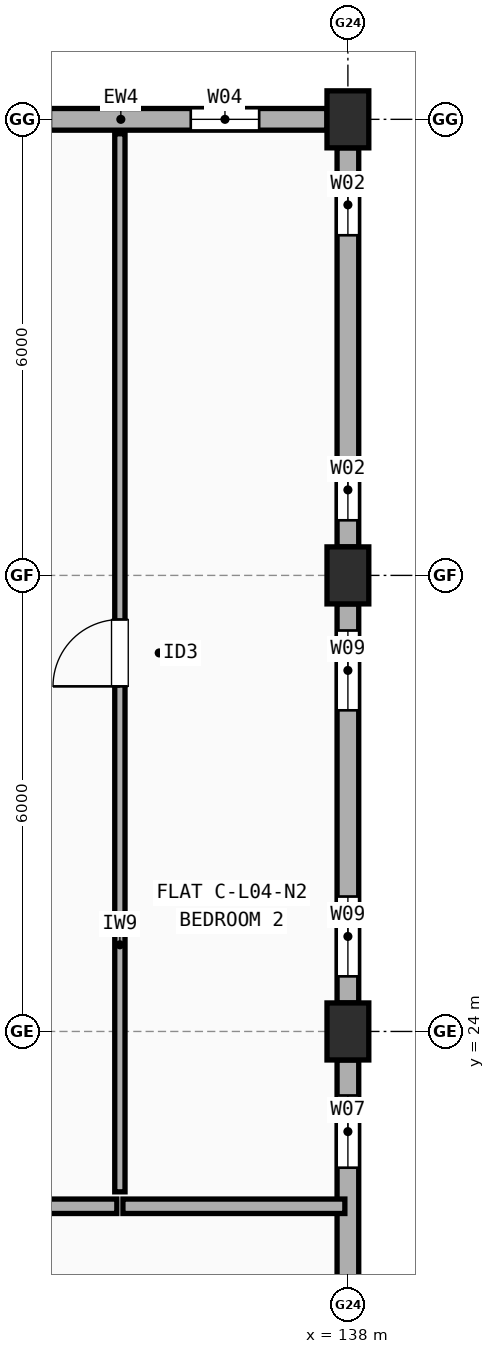
"""IFC4 building model, lengths in metres.
Left out: names, types, materials, properties, quantities, classifications, styles, units other than length and angle.
Written with IfcOpenShell. Run it as: python <this file> out.ifc"""

import sys

from ifc_helpers import new_model, si_unit, direction, frame, frame_2d, origin, origin_2d, place, context, subcontext, project, spatial, rectangle, extrude, element, fill, save


model = new_model("IFC4")
c1 = context("Model", 3, precision=1e-05, world=origin(), true_north=direction((0.0, 1.0)))
c2 = subcontext(c1, "Body", "Model", "MODEL_VIEW")
j1 = project(units=[si_unit("LENGTHUNIT", "METRE"), si_unit("PLANEANGLEUNIT", "RADIAN")], contexts=[c1])
p1 = place(None, origin())
s1 = spatial("IfcSite", under=j1, at=p1, CompositionType="ELEMENT")
p2 = place(p1, origin())
s2 = spatial("IfcBuilding", under=s1, at=p2, CompositionType="ELEMENT")
p3 = place(p2, frame((0.0, 0.0, 14.1)))
s3 = spatial("IfcBuildingStorey", under=s2, at=p3, CompositionType="ELEMENT", Elevation=14.1)
for number, where, z_axis, x_axis in (
    (1, (138.0, 24.0, 0.0), (0.0, 0.0, 1.0), (1.0, 0.0, 0.0)),
    (2, (138.0, 30.0, 0.0), (0.0, 0.0, 1.0), (1.0, 0.0, 0.0)),
    (3, (138.0, 36.0, 0.0), (0.0, 0.0, 1.0), (1.0, 0.0, 0.0)),
):
    element("IfcColumn", number, at=place(p3, frame(where, z_axis=z_axis, x_axis=x_axis)), inside=s3, PredefinedType="COLUMN", context=c2, shape_type="SweptSolid", body=[
        extrude(rectangle(XDim=0.55, YDim=0.75, at=origin_2d()), origin(), (0.0, 0.0, 1.0), 2.95),
    ])
p4 = place(p3, frame((138.0, 18.375, 0.0), z_axis=(0.0, 0.0, 1.0), x_axis=(0.0, 1.0, 0.0)))
e4 = element("IfcWall", 4, at=p4, inside=s3, PredefinedType="STANDARD", context=c2, shape_type="SweptSolid", body=[
    extrude(rectangle(XDim=5.25, YDim=0.285, at=frame_2d((2.625, 0.0))), origin(), (0.0, 0.0, 1.0), 2.432),
])
p5 = place(p4, frame((1.192, 0.0, 0.9)))
e5 = element("IfcOpeningElement", 5, at=p5, cuts=e4, PredefinedType="OPENING", context=c2, shape_type="SweptSolid", body=[
    extrude(rectangle(XDim=0.9, YDim=1.3, at=frame_2d((0.45, 0.65))), frame((0.0, 0.152, 0.0), z_axis=(0.0, -1.0, 0.0), x_axis=(1.0, 0.0, 0.0)), (0.0, 0.0, 1.0), 0.305),
])
p6 = place(p4, frame((3.833, 0.0, 0.9)))
e6 = element("IfcOpeningElement", 6, at=p6, cuts=e4, PredefinedType="OPENING", context=c2, shape_type="SweptSolid", body=[
    extrude(rectangle(XDim=0.95, YDim=1.35, at=frame_2d((0.475, 0.675))), frame((0.0, 0.152, 0.0), z_axis=(0.0, -1.0, 0.0), x_axis=(1.0, 0.0, 0.0)), (0.0, 0.0, 1.0), 0.305),
])
p7 = place(p3, frame((138.0, 24.375, 0.0), z_axis=(0.0, 0.0, 1.0), x_axis=(0.0, 1.0, 0.0)))
e7 = element("IfcWall", 7, at=p7, inside=s3, PredefinedType="STANDARD", context=c2, shape_type="SweptSolid", body=[
    extrude(rectangle(XDim=5.25, YDim=0.285, at=frame_2d((2.625, 0.0))), origin(), (0.0, 0.0, 1.0), 2.432),
])
p8 = place(p7, frame((0.35, 0.0, 0.9)))
e8 = element("IfcOpeningElement", 8, at=p8, cuts=e7, PredefinedType="OPENING", context=c2, shape_type="SweptSolid", body=[
    extrude(rectangle(XDim=1.05, YDim=1.35, at=frame_2d((0.525, 0.675))), frame((0.0, 0.152, 0.0), z_axis=(0.0, -1.0, 0.0), x_axis=(1.0, 0.0, 0.0)), (0.0, 0.0, 1.0), 0.305),
])
p9 = place(p7, frame((3.85, 0.0, 0.9)))
e9 = element("IfcOpeningElement", 9, at=p9, cuts=e7, PredefinedType="OPENING", context=c2, shape_type="SweptSolid", body=[
    extrude(rectangle(XDim=1.05, YDim=1.35, at=frame_2d((0.525, 0.675))), frame((0.0, 0.152, 0.0), z_axis=(0.0, -1.0, 0.0), x_axis=(1.0, 0.0, 0.0)), (0.0, 0.0, 1.0), 0.305),
])
p10 = place(p3, frame((138.0, 30.375, 0.0), z_axis=(0.0, 0.0, 1.0), x_axis=(0.0, 1.0, 0.0)))
e10 = element("IfcWall", 10, at=p10, inside=s3, PredefinedType="STANDARD", context=c2, shape_type="SweptSolid", body=[
    extrude(rectangle(XDim=5.25, YDim=0.285, at=frame_2d((2.625, 0.0))), origin(), (0.0, 0.0, 1.0), 2.432),
])
p11 = place(p10, frame((0.35, 0.0, 0.9)))
e11 = element("IfcOpeningElement", 11, at=p11, cuts=e10, PredefinedType="OPENING", context=c2, shape_type="SweptSolid", body=[
    extrude(rectangle(XDim=0.8, YDim=1.2, at=frame_2d((0.4, 0.6))), frame((0.0, 0.152, 0.0), z_axis=(0.0, -1.0, 0.0), x_axis=(1.0, 0.0, 0.0)), (0.0, 0.0, 1.0), 0.305),
])
p12 = place(p10, frame((4.1, 0.0, 0.9)))
e12 = element("IfcOpeningElement", 12, at=p12, cuts=e10, PredefinedType="OPENING", context=c2, shape_type="SweptSolid", body=[
    extrude(rectangle(XDim=0.8, YDim=1.2, at=frame_2d((0.4, 0.6))), frame((0.0, 0.152, 0.0), z_axis=(0.0, -1.0, 0.0), x_axis=(1.0, 0.0, 0.0)), (0.0, 0.0, 1.0), 0.305),
])
p13 = place(p3, frame((137.725, 36.0, 0.0), z_axis=(0.0, 0.0, 1.0), x_axis=(-1.0, 0.0, 0.0)))
e13 = element("IfcWall", 13, at=p13, inside=s3, PredefinedType="STANDARD", context=c2, shape_type="SweptSolid", body=[
    extrude(rectangle(XDim=5.45, YDim=0.285, at=frame_2d((2.725, 0.0))), origin(), (0.0, 0.0, 1.0), 2.432),
])
p14 = place(p13, frame((0.893, 0.0, 0.9)))
e14 = element("IfcOpeningElement", 14, at=p14, cuts=e13, PredefinedType="OPENING", context=c2, shape_type="SweptSolid", body=[
    extrude(rectangle(XDim=0.9, YDim=1.3, at=frame_2d((0.45, 0.65))), frame((0.0, 0.152, 0.0), z_axis=(0.0, -1.0, 0.0), x_axis=(1.0, 0.0, 0.0)), (0.0, 0.0, 1.0), 0.305),
])
p15 = place(p13, frame((3.633, 0.0, 0.9)))
e15 = element("IfcOpeningElement", 15, at=p15, cuts=e13, PredefinedType="OPENING", context=c2, shape_type="SweptSolid", body=[
    extrude(rectangle(XDim=0.95, YDim=1.35, at=frame_2d((0.475, 0.675))), frame((0.0, 0.152, 0.0), z_axis=(0.0, -1.0, 0.0), x_axis=(1.0, 0.0, 0.0)), (0.0, 0.0, 1.0), 0.305),
])
p16 = place(p3, frame((124.54, 21.7, 0.0), z_axis=(0.0, 0.0, 1.0), x_axis=(1.0, 0.0, 0.0)))
e16 = element("IfcWall", 16, at=p16, inside=s3, PredefinedType="SOLIDWALL", context=c2, shape_type="SweptSolid", body=[
    extrude(rectangle(XDim=10.42, YDim=0.19, at=frame_2d((5.21, 0.0))), origin(), (0.0, 0.0, 1.0), 2.432),
])
p17 = place(p16, frame((4.72, 0.0, 0.0)))
e17 = element("IfcOpeningElement", 17, at=p17, cuts=e16, PredefinedType="OPENING", context=c2, shape_type="SweptSolid", body=[
    extrude(rectangle(XDim=0.98, YDim=2.15, at=frame_2d((0.49, 1.075))), frame((0.0, 0.105, 0.0), z_axis=(0.0, -1.0, 0.0), x_axis=(1.0, 0.0, 0.0)), (0.0, 0.0, 1.0), 0.21),
])
p18 = place(p3, frame((135.04, 21.7, 0.0), z_axis=(0.0, 0.0, 1.0), x_axis=(1.0, 0.0, 0.0)))
e18 = element("IfcWall", 18, at=p18, inside=s3, PredefinedType="SOLIDWALL", context=c2, shape_type="SweptSolid", body=[
    extrude(rectangle(XDim=2.92, YDim=0.19, at=frame_2d((1.46, 0.0))), origin(), (0.0, 0.0, 1.0), 2.432),
])
p19 = place(p3, frame((135.0, 21.89, 0.0), z_axis=(0.0, 0.0, 1.0), x_axis=(0.0, 1.0, 0.0)))
e19 = element("IfcWall", 19, at=p19, inside=s3, PredefinedType="PARTITIONING", context=c2, shape_type="SweptSolid", body=[
    extrude(rectangle(XDim=13.92, YDim=0.135, at=frame_2d((6.96, 0.0))), origin(), (0.0, 0.0, 1.0), 2.432),
])
p20 = place(p19, frame((6.65, 0.0, 0.0)))
e20 = element("IfcOpeningElement", 20, at=p20, cuts=e19, PredefinedType="OPENING", context=c2, shape_type="SweptSolid", body=[
    extrude(rectangle(XDim=0.88, YDim=2.1, at=frame_2d((0.44, 1.05))), frame((0.0, 0.077, 0.0), z_axis=(0.0, -1.0, 0.0), x_axis=(1.0, 0.0, 0.0)), (0.0, 0.0, 1.0), 0.155),
])
p21 = place(p6, origin())
e21 = element("IfcWindow", 21, at=p21, inside=s3, PartitioningType="SINGLE_PANEL", PredefinedType="WINDOW", context=c2, shape_type="SweptSolid", body=[
    extrude(rectangle(XDim=0.95, YDim=1.35, at=frame_2d((0.475, 0.675))), frame((0.0, 0.03, 0.0), z_axis=(0.0, -1.0, 0.0), x_axis=(1.0, 0.0, 0.0)), (0.0, 0.0, 1.0), 0.06),
])
fill(e6, e21)
p22 = place(p8, origin())
e22 = element("IfcWindow", 22, at=p22, inside=s3, PartitioningType="SINGLE_PANEL", PredefinedType="WINDOW", context=c2, shape_type="SweptSolid", body=[
    extrude(rectangle(XDim=1.05, YDim=1.35, at=frame_2d((0.525, 0.675))), frame((0.0, 0.03, 0.0), z_axis=(0.0, -1.0, 0.0), x_axis=(1.0, 0.0, 0.0)), (0.0, 0.0, 1.0), 0.06),
])
fill(e8, e22)
p23 = place(p9, origin())
e23 = element("IfcWindow", 23, at=p23, inside=s3, PartitioningType="SINGLE_PANEL", PredefinedType="WINDOW", context=c2, shape_type="SweptSolid", body=[
    extrude(rectangle(XDim=1.05, YDim=1.35, at=frame_2d((0.525, 0.675))), frame((0.0, 0.03, 0.0), z_axis=(0.0, -1.0, 0.0), x_axis=(1.0, 0.0, 0.0)), (0.0, 0.0, 1.0), 0.06),
])
fill(e9, e23)
p24 = place(p11, origin())
e24 = element("IfcWindow", 24, at=p24, inside=s3, PartitioningType="SINGLE_PANEL", PredefinedType="WINDOW", context=c2, shape_type="SweptSolid", body=[
    extrude(rectangle(XDim=0.8, YDim=1.2, at=frame_2d((0.4, 0.6))), frame((0.0, 0.03, 0.0), z_axis=(0.0, -1.0, 0.0), x_axis=(1.0, 0.0, 0.0)), (0.0, 0.0, 1.0), 0.06),
])
fill(e11, e24)
p25 = place(p12, origin())
e25 = element("IfcWindow", 25, at=p25, inside=s3, PartitioningType="SINGLE_PANEL", PredefinedType="WINDOW", context=c2, shape_type="SweptSolid", body=[
    extrude(rectangle(XDim=0.8, YDim=1.2, at=frame_2d((0.4, 0.6))), frame((0.0, 0.03, 0.0), z_axis=(0.0, -1.0, 0.0), x_axis=(1.0, 0.0, 0.0)), (0.0, 0.0, 1.0), 0.06),
])
fill(e12, e25)
p26 = place(p14, origin())
e26 = element("IfcWindow", 26, at=p26, inside=s3, PartitioningType="SINGLE_PANEL", PredefinedType="WINDOW", context=c2, shape_type="SweptSolid", body=[
    extrude(rectangle(XDim=0.9, YDim=1.3, at=frame_2d((0.45, 0.65))), frame((0.0, 0.03, 0.0), z_axis=(0.0, -1.0, 0.0), x_axis=(1.0, 0.0, 0.0)), (0.0, 0.0, 1.0), 0.06),
])
fill(e14, e26)
p27 = place(p20, origin())
e27 = element("IfcDoor", 27, at=p27, inside=s3, OperationType="SINGLE_SWING_LEFT", PredefinedType="DOOR", context=c2, shape_type="SweptSolid", body=[
    extrude(rectangle(XDim=0.88, YDim=2.1, at=frame_2d((0.44, 1.05))), frame((0.0, 0.025, 0.0), z_axis=(0.0, -1.0, 0.0), x_axis=(1.0, 0.0, 0.0)), (0.0, 0.0, 1.0), 0.05),
])
fill(e20, e27)
save(model, sys.argv[1])
